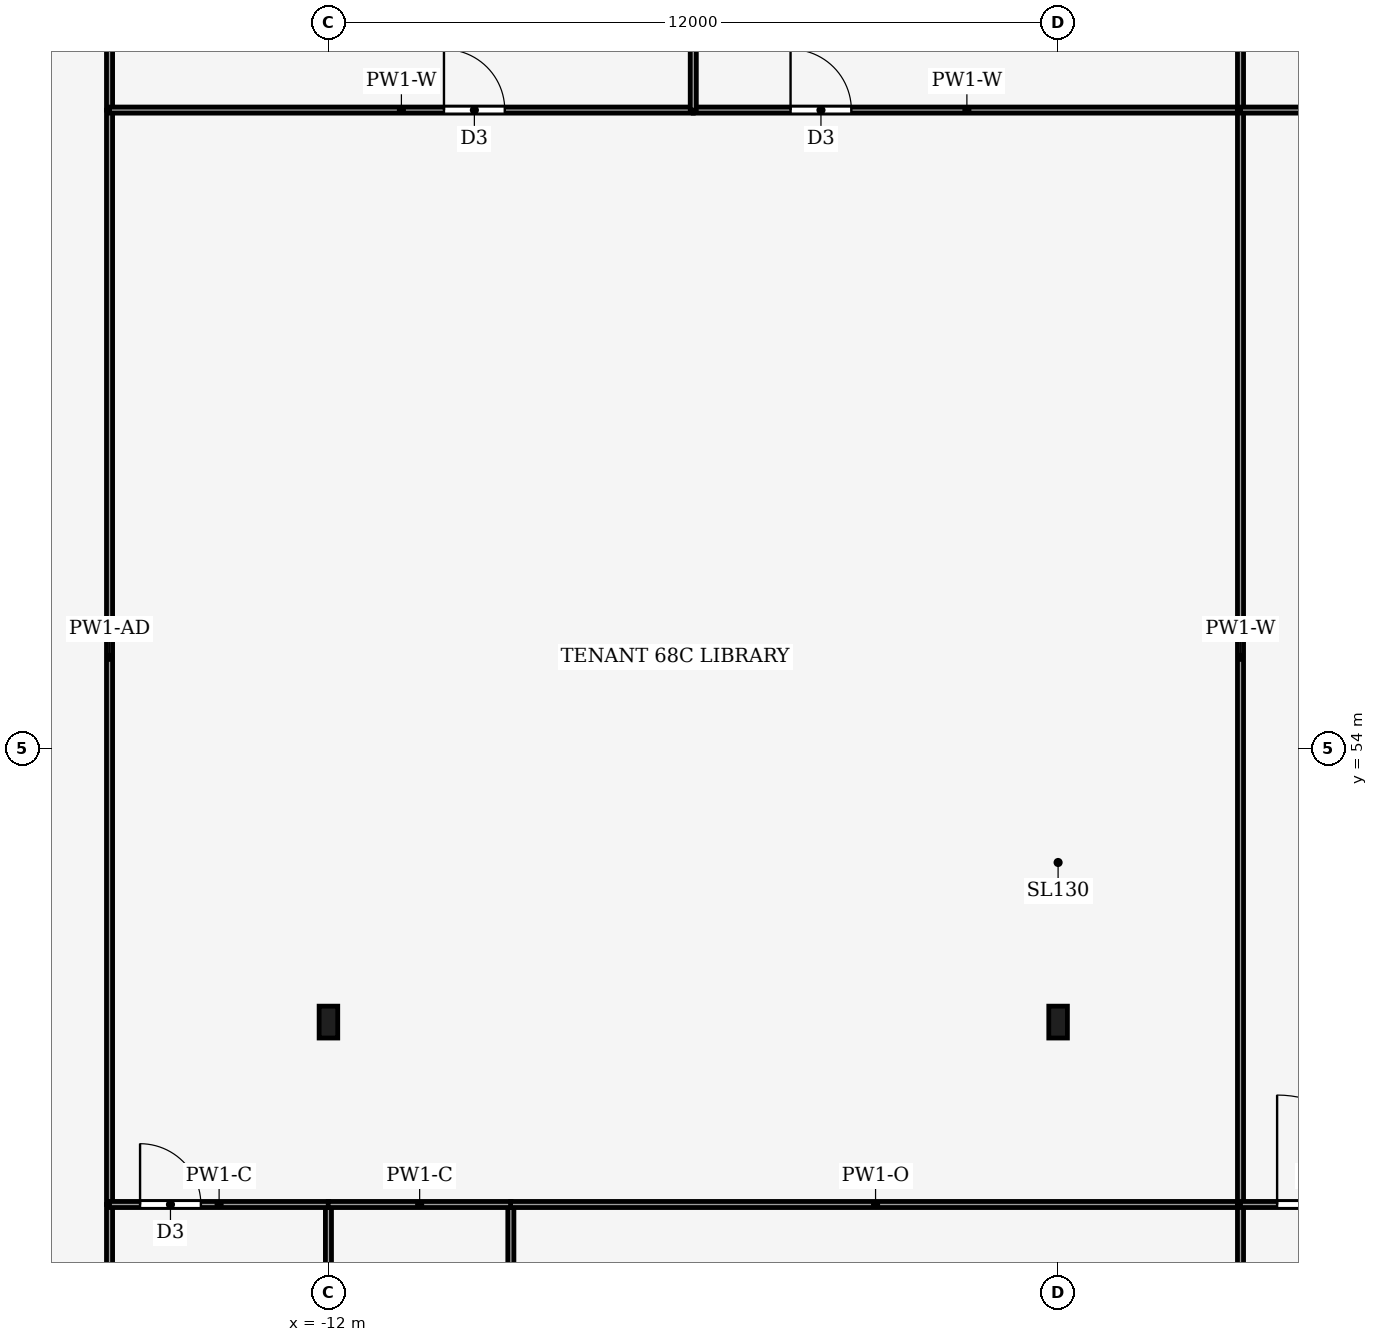
"""IFC4 building model, lengths in metres.
Left out: names, types, materials, properties, quantities, classifications, styles, units other than length and angle.
Written with IfcOpenShell. Run it as: python <this file> out.ifc"""

import sys

from ifc_helpers import new_model, si_unit, direction, frame, frame_2d, origin, origin_2d, place, context, subcontext, project, spatial, rectangle, i_section, extrude, element, fill, save


model = new_model("IFC4")
c1 = context("Model", 3, precision=1e-05, world=origin(), true_north=direction((0.0, 1.0)))
c2 = subcontext(c1, "Body", "Model", "MODEL_VIEW")
j1 = project(units=[si_unit("LENGTHUNIT", "METRE"), si_unit("PLANEANGLEUNIT", "RADIAN")], contexts=[c1])
p1 = place(None, origin())
s1 = spatial("IfcSite", under=j1, at=p1, CompositionType="ELEMENT")
p2 = place(p1, origin())
s2 = spatial("IfcBuilding", under=s1, at=p2, CompositionType="ELEMENT")
p3 = place(p2, frame((0.0, 0.0, 298.0)))
s3 = spatial("IfcBuildingStorey", under=s2, at=p3, CompositionType="ELEMENT", Elevation=298.0)
for number, where, z_axis, x_axis in (
    (1, (-12.0, 49.5, 0.0), (0.0, 0.0, 1.0), (1.0, 0.0, 0.0)),
    (2, (0.0, 49.5, 0.0), (0.0, 0.0, 1.0), (1.0, 0.0, 0.0)),
):
    element("IfcColumn", number, at=place(p3, frame(where, z_axis=z_axis, x_axis=x_axis)), inside=s3, PredefinedType="COLUMN", context=c2, shape_type="SweptSolid", body=[
        extrude(i_section(OverallWidth=0.306, OverallDepth=0.524, WebThickness=0.012, FlangeThickness=0.04, FilletRadius=0.027, at=origin_2d()), origin(), (0.0, 0.0, 1.0), 4.0),
    ])
p4 = place(p3, frame((-15.6, 40.6, 0.0), z_axis=(0.0, 0.0, 1.0), x_axis=(0.0, 1.0, 0.0)))
e3 = element("IfcWall", 3, at=p4, inside=s3, PredefinedType="PARTITIONING", context=c2, shape_type="SweptSolid", body=[
    extrude(rectangle(XDim=5.9, YDim=0.1, at=frame_2d((2.95, 0.0))), origin(), (0.0, 0.0, 1.0), 3.87),
])
p5 = place(p3, frame((-15.6, 46.5, 0.0), z_axis=(0.0, 0.0, 1.0), x_axis=(0.0, 1.0, 0.0)))
e4 = element("IfcWall", 4, at=p5, inside=s3, PredefinedType="PARTITIONING", context=c2, shape_type="SweptSolid", body=[
    extrude(rectangle(XDim=18.0, YDim=0.1, at=frame_2d((9.0, 0.0))), origin(), (0.0, 0.0, 1.0), 3.35),
])
p6 = place(p3, frame((-15.6, 64.5, 0.0), z_axis=(0.0, 0.0, 1.0), x_axis=(0.0, 1.0, 0.0)))
e5 = element("IfcWall", 5, at=p6, inside=s3, PredefinedType="PARTITIONING", context=c2, shape_type="SweptSolid", body=[
    extrude(rectangle(XDim=4.51, YDim=0.1, at=frame_2d((2.255, 0.0))), origin(), (0.0, 0.0, 1.0), 2.93),
])
p7 = place(p3, frame((-12.0, 46.5, 0.0), z_axis=(0.0, 0.0, 1.0), x_axis=(0.0, -1.0, 0.0)))
e6 = element("IfcWall", 6, at=p7, inside=s3, PredefinedType="PARTITIONING", context=c2, shape_type="SweptSolid", body=[
    extrude(rectangle(XDim=5.9, YDim=0.1, at=frame_2d((2.95, 0.0))), origin(), (0.0, 0.0, 1.0), 3.39),
])
p8 = place(p7, frame((2.45, 0.0, 0.0)))
e7 = element("IfcOpeningElement", 7, at=p8, cuts=e6, PredefinedType="OPENING", context=c2, shape_type="SweptSolid", body=[
    extrude(rectangle(XDim=1.0, YDim=2.1, at=frame_2d((0.5, 1.05))), frame((0.0, 0.06, 0.0), z_axis=(0.0, -1.0, 0.0), x_axis=(1.0, 0.0, 0.0)), (0.0, 0.0, 1.0), 0.12),
])
p9 = place(p3, frame((-15.6, 46.5, 0.0), z_axis=(0.0, 0.0, 1.0), x_axis=(1.0, 0.0, 0.0)))
e8 = element("IfcWall", 8, at=p9, inside=s3, PredefinedType="PARTITIONING", context=c2, shape_type="SweptSolid", body=[
    extrude(rectangle(XDim=3.604, YDim=0.1, at=frame_2d((1.802, 0.0))), origin(), (0.0, 0.0, 1.0), 3.87),
])
p10 = place(p9, frame((0.502, 0.0, 0.0)))
e9 = element("IfcOpeningElement", 9, at=p10, cuts=e8, PredefinedType="OPENING", context=c2, shape_type="SweptSolid", body=[
    extrude(rectangle(XDim=1.0, YDim=2.1, at=frame_2d((0.5, 1.05))), frame((0.0, 0.06, 0.0), z_axis=(0.0, -1.0, 0.0), x_axis=(1.0, 0.0, 0.0)), (0.0, 0.0, 1.0), 0.12),
])
p11 = place(p3, frame((-9.0, 40.6, 0.0), z_axis=(0.0, 0.0, 1.0), x_axis=(0.0, 1.0, 0.0)))
e10 = element("IfcWall", 10, at=p11, inside=s3, PredefinedType="PARTITIONING", context=c2, shape_type="SweptSolid", body=[
    extrude(rectangle(XDim=5.9, YDim=0.1, at=frame_2d((2.95, 0.0))), origin(), (0.0, 0.0, 1.0), 3.87),
])
p12 = place(p3, frame((-8.996, 46.5, 0.0), z_axis=(0.0, 0.0, 1.0), x_axis=(-1.0, 0.0, 0.0)))
e11 = element("IfcWall", 11, at=p12, inside=s3, PredefinedType="PARTITIONING", context=c2, shape_type="SweptSolid", body=[
    extrude(rectangle(XDim=3.008, YDim=0.1, at=frame_2d((1.504, 0.0))), origin(), (0.0, 0.0, 1.0), 3.87),
])
p13 = place(p3, frame((3.0, 46.5, 0.0), z_axis=(0.0, 0.0, 1.0), x_axis=(-1.0, 0.0, 0.0)))
e12 = element("IfcWall", 12, at=p13, inside=s3, PredefinedType="PARTITIONING", context=c2, shape_type="SweptSolid", body=[
    extrude(rectangle(XDim=12.004, YDim=0.1, at=frame_2d((6.002, 0.0))), origin(), (0.0, 0.0, 1.0), 3.39),
])
p14 = place(p3, frame((3.0, 40.6, 0.0), z_axis=(0.0, 0.0, 1.0), x_axis=(0.0, 1.0, 0.0)))
e13 = element("IfcWall", 13, at=p14, inside=s3, PredefinedType="PARTITIONING", context=c2, shape_type="SweptSolid", body=[
    extrude(rectangle(XDim=5.9, YDim=0.1, at=frame_2d((2.95, 0.0))), origin(), (0.0, 0.0, 1.0), 3.87),
])
p15 = place(p3, frame((-15.6, 64.5, 0.0), z_axis=(0.0, 0.0, 1.0), x_axis=(1.0, 0.0, 0.0)))
e14 = element("IfcWall", 14, at=p15, inside=s3, PredefinedType="PARTITIONING", context=c2, shape_type="SweptSolid", body=[
    extrude(rectangle(XDim=9.6, YDim=0.1, at=frame_2d((4.8, 0.0))), origin(), (0.0, 0.0, 1.0), 3.24),
])
p16 = place(p15, frame((5.5, 0.0, 0.0)))
e15 = element("IfcOpeningElement", 15, at=p16, cuts=e14, PredefinedType="OPENING", context=c2, shape_type="SweptSolid", body=[
    extrude(rectangle(XDim=1.0, YDim=2.1, at=frame_2d((0.5, 1.05))), frame((0.0, 0.06, 0.0), z_axis=(0.0, -1.0, 0.0), x_axis=(1.0, 0.0, 0.0)), (0.0, 0.0, 1.0), 0.12),
])
p17 = place(p3, frame((-6.0, 64.5, 0.0), z_axis=(0.0, 0.0, 1.0), x_axis=(1.0, 0.0, 0.0)))
e16 = element("IfcWall", 16, at=p17, inside=s3, PredefinedType="PARTITIONING", context=c2, shape_type="SweptSolid", body=[
    extrude(rectangle(XDim=9.0, YDim=0.1, at=frame_2d((4.5, 0.0))), origin(), (0.0, 0.0, 1.0), 3.24),
])
p18 = place(p17, frame((1.6, 0.0, 0.0)))
e17 = element("IfcOpeningElement", 17, at=p18, cuts=e16, PredefinedType="OPENING", context=c2, shape_type="SweptSolid", body=[
    extrude(rectangle(XDim=1.0, YDim=2.1, at=frame_2d((0.5, 1.05))), frame((0.0, 0.06, 0.0), z_axis=(0.0, -1.0, 0.0), x_axis=(1.0, 0.0, 0.0)), (0.0, 0.0, 1.0), 0.12),
])
p19 = place(p3, frame((3.0, 46.5, 0.0), z_axis=(0.0, 0.0, 1.0), x_axis=(0.0, 1.0, 0.0)))
e18 = element("IfcWall", 18, at=p19, inside=s3, PredefinedType="PARTITIONING", context=c2, shape_type="SweptSolid", body=[
    extrude(rectangle(XDim=18.0, YDim=0.1, at=frame_2d((9.0, 0.0))), origin(), (0.0, 0.0, 1.0), 3.24),
])
p20 = place(p3, frame((-6.0, 64.5, 0.0), z_axis=(0.0, 0.0, 1.0), x_axis=(0.0, 1.0, 0.0)))
e19 = element("IfcWall", 19, at=p20, inside=s3, PredefinedType="PARTITIONING", context=c2, shape_type="SweptSolid", body=[
    extrude(rectangle(XDim=3.67, YDim=0.1, at=frame_2d((1.835, 0.0))), origin(), (0.0, 0.0, 1.0), 3.04),
])
p21 = place(p3, frame((3.0, 64.5, 0.0), z_axis=(0.0, 0.0, 1.0), x_axis=(0.0, 1.0, 0.0)))
e20 = element("IfcWall", 20, at=p21, inside=s3, PredefinedType="PARTITIONING", context=c2, shape_type="SweptSolid", body=[
    extrude(rectangle(XDim=3.375, YDim=0.1, at=frame_2d((1.688, 0.0))), origin(), (0.0, 0.0, 1.0), 3.04),
])
p22 = place(p3, frame((3.0, 46.5, 0.0), z_axis=(0.0, 0.0, 1.0), x_axis=(1.0, 0.0, 0.0)))
e21 = element("IfcWall", 21, at=p22, inside=s3, PredefinedType="PARTITIONING", context=c2, shape_type="SweptSolid", body=[
    extrude(rectangle(XDim=3.004, YDim=0.1, at=frame_2d((1.502, 0.0))), origin(), (0.0, 0.0, 1.0), 3.39),
])
p23 = place(p22, frame((0.602, 0.0, 0.0)))
e22 = element("IfcOpeningElement", 22, at=p23, cuts=e21, PredefinedType="OPENING", context=c2, shape_type="SweptSolid", body=[
    extrude(rectangle(XDim=1.8, YDim=2.1, at=frame_2d((0.9, 1.05))), frame((0.0, 0.06, 0.0), z_axis=(0.0, -1.0, 0.0), x_axis=(1.0, 0.0, 0.0)), (0.0, 0.0, 1.0), 0.12),
])
p24 = place(p3, frame((3.0, 64.5, 0.0), z_axis=(0.0, 0.0, 1.0), x_axis=(1.0, 0.0, 0.0)))
e23 = element("IfcWall", 23, at=p24, inside=s3, PredefinedType="PARTITIONING", context=c2, shape_type="SweptSolid", body=[
    extrude(rectangle(XDim=12.6, YDim=0.1, at=frame_2d((6.3, 0.0))), origin(), (0.0, 0.0, 1.0), 3.24),
])
p25 = place(p24, frame((5.8, 0.0, 0.0)))
e24 = element("IfcOpeningElement", 24, at=p25, cuts=e23, PredefinedType="OPENING", context=c2, shape_type="SweptSolid", body=[
    extrude(rectangle(XDim=1.0, YDim=2.1, at=frame_2d((0.5, 1.05))), frame((0.0, 0.06, 0.0), z_axis=(0.0, -1.0, 0.0), x_axis=(1.0, 0.0, 0.0)), (0.0, 0.0, 1.0), 0.12),
])
p26 = place(p10, origin())
e25 = element("IfcDoor", 25, at=p26, inside=s3, OperationType="SINGLE_SWING_LEFT", PredefinedType="DOOR", context=c2, shape_type="SweptSolid", body=[
    extrude(rectangle(XDim=1.0, YDim=2.1, at=frame_2d((0.5, 1.05))), frame((0.0, 0.025, 0.0), z_axis=(0.0, -1.0, 0.0), x_axis=(1.0, 0.0, 0.0)), (0.0, 0.0, 1.0), 0.05),
])
fill(e9, e25)
p27 = place(p16, origin())
e26 = element("IfcDoor", 26, at=p27, inside=s3, OperationType="SINGLE_SWING_RIGHT", PredefinedType="DOOR", context=c2, shape_type="SweptSolid", body=[
    extrude(rectangle(XDim=1.0, YDim=2.1, at=frame_2d((0.5, 1.05))), frame((0.0, 0.025, 0.0), z_axis=(0.0, -1.0, 0.0), x_axis=(1.0, 0.0, 0.0)), (0.0, 0.0, 1.0), 0.05),
])
fill(e15, e26)
p28 = place(p18, origin())
e27 = element("IfcDoor", 27, at=p28, inside=s3, OperationType="SINGLE_SWING_LEFT", PredefinedType="DOOR", context=c2, shape_type="SweptSolid", body=[
    extrude(rectangle(XDim=1.0, YDim=2.1, at=frame_2d((0.5, 1.05))), frame((0.0, 0.025, 0.0), z_axis=(0.0, -1.0, 0.0), x_axis=(1.0, 0.0, 0.0)), (0.0, 0.0, 1.0), 0.05),
])
fill(e17, e27)
p29 = place(p23, origin())
e28 = element("IfcDoor", 28, at=p29, inside=s3, OperationType="DOUBLE_DOOR_SINGLE_SWING", PredefinedType="DOOR", context=c2, shape_type="SweptSolid", body=[
    extrude(rectangle(XDim=1.8, YDim=2.1, at=frame_2d((0.9, 1.05))), frame((0.0, 0.025, 0.0), z_axis=(0.0, -1.0, 0.0), x_axis=(1.0, 0.0, 0.0)), (0.0, 0.0, 1.0), 0.05),
])
fill(e22, e28)
save(model, sys.argv[1])
